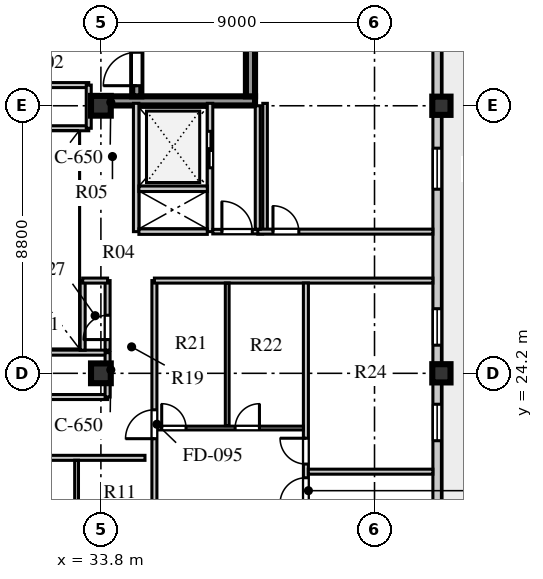
"""IFC4 building model, lengths in metres.
Left out: names, types, materials, properties, quantities, classifications, styles, units other than length and angle.
Written with IfcOpenShell. Run it as: python <this file> out.ifc"""

import sys

from ifc_helpers import new_model, si_unit, direction, frame, frame_2d, origin, origin_2d, place, context, subcontext, project, spatial, rectangle, extrude, element, fill, save


model = new_model("IFC4")
c1 = context("Model", 3, precision=1e-05, world=origin(), true_north=direction((0.0, 1.0)))
c2 = subcontext(c1, "Body", "Model", "MODEL_VIEW")
j1 = project(units=[si_unit("LENGTHUNIT", "METRE"), si_unit("PLANEANGLEUNIT", "RADIAN")], contexts=[c1])
p1 = place(None, origin())
s1 = spatial("IfcSite", under=j1, at=p1, CompositionType="ELEMENT")
p2 = place(p1, origin())
s2 = spatial("IfcBuilding", under=s1, at=p2, CompositionType="ELEMENT")
p3 = place(p2, frame((0.0, 0.0, 327.7)))
s3 = spatial("IfcBuildingStorey", under=s2, at=p3, CompositionType="ELEMENT", Elevation=327.7)
p4 = place(p3, frame((34.125, 33.16, 0.0), z_axis=(0.0, 0.0, 1.0), x_axis=(1.0, 0.0, 0.0)))
e1 = element("IfcWall", 1, at=p4, inside=s3, PredefinedType="SHEAR", context=c2, shape_type="SweptSolid", body=[
    extrude(rectangle(XDim=4.745, YDim=0.3, at=frame_2d((2.373, 0.0))), origin(), (0.0, 0.0, 1.0), 3.56),
])
p5 = place(p3, frame((34.98, 33.31, 0.0), z_axis=(0.0, 0.0, 1.0), x_axis=(0.0, 1.0, 0.0)))
e2 = element("IfcWall", 2, at=p5, inside=s3, PredefinedType="SHEAR", context=c2, shape_type="SweptSolid", body=[
    extrude(rectangle(XDim=8.03, YDim=0.3, at=frame_2d((4.015, 0.0))), origin(), (0.0, 0.0, 1.0), 3.56),
])
p6 = place(p5, frame((0.35, 0.0, 0.0)))
e3 = element("IfcOpeningElement", 3, at=p6, cuts=e2, PredefinedType="OPENING", context=c2, shape_type="SweptSolid", body=[
    extrude(rectangle(XDim=1.1, YDim=2.1, at=frame_2d((0.55, 1.05))), frame((0.0, 0.16, 0.0), z_axis=(0.0, -1.0, 0.0), x_axis=(1.0, 0.0, 0.0)), (0.0, 0.0, 1.0), 0.32),
])
p7 = place(p3, frame((38.72, 33.31, 0.0), z_axis=(0.0, 0.0, 1.0), x_axis=(0.0, 1.0, 0.0)))
e4 = element("IfcWall", 4, at=p7, inside=s3, PredefinedType="SHEAR", context=c2, shape_type="SweptSolid", body=[
    extrude(rectangle(XDim=8.03, YDim=0.3, at=frame_2d((4.015, 0.0))), origin(), (0.0, 0.0, 1.0), 3.56),
])
for number, where, z_axis, x_axis in (
    (5, (33.8, 24.2, 0.0), (0.0, 0.0, 1.0), (1.0, 0.0, 0.0)),
    (6, (33.8, 33.0, 0.0), (0.0, 0.0, 1.0), (1.0, 0.0, 0.0)),
):
    element("IfcColumn", number, at=place(p3, frame(where, z_axis=z_axis, x_axis=x_axis)), inside=s3, PredefinedType="COLUMN", context=c2, shape_type="SweptSolid", body=[
        extrude(rectangle(XDim=0.65, YDim=0.65, at=origin_2d()), origin(), (0.0, 0.0, 1.0), 3.56),
    ])
for number, where, z_axis, x_axis in (
    (7, (45.0, 24.2, 0.0), (0.0, 0.0, 1.0), (1.0, 0.0, 0.0)),
    (8, (45.0, 33.0, 0.0), (0.0, 0.0, 1.0), (1.0, 0.0, 0.0)),
):
    element("IfcColumn", number, at=place(p3, frame(where, z_axis=z_axis, x_axis=x_axis)), inside=s3, PredefinedType="COLUMN", context=c2, shape_type="SweptSolid", body=[
        extrude(rectangle(XDim=0.6, YDim=0.6, at=origin_2d()), origin(), (0.0, 0.0, 1.0), 3.56),
    ])
p8 = place(p3, frame((44.86, 14.68, 0.0), z_axis=(0.0, 0.0, 1.0), x_axis=(0.0, 1.0, 0.0)))
e9 = element("IfcWall", 9, at=p8, inside=s3, PredefinedType="STANDARD", context=c2, shape_type="SweptSolid", body=[
    extrude(rectangle(XDim=27.84, YDim=0.28, at=frame_2d((13.92, 0.0))), origin(), (0.0, 0.0, 1.0), 2.92),
])
p9 = place(p8, frame((1.3, 0.0, 0.0)))
e10 = element("IfcOpeningElement", 10, at=p9, cuts=e9, PredefinedType="OPENING", context=c2, shape_type="SweptSolid", body=[
    extrude(rectangle(XDim=1.2, YDim=2.05, at=frame_2d((0.6, 1.025))), frame((0.0, 0.15, 0.0), z_axis=(0.0, -1.0, 0.0), x_axis=(1.0, 0.0, 0.0)), (0.0, 0.0, 1.0), 0.3),
])
p10 = place(p8, frame((3.703, 0.0, 0.8)))
e11 = element("IfcOpeningElement", 11, at=p10, cuts=e9, PredefinedType="OPENING", context=c2, shape_type="SweptSolid", body=[
    extrude(rectangle(XDim=1.2, YDim=1.75, at=frame_2d((0.6, 0.875))), frame((0.0, 0.15, 0.0), z_axis=(0.0, -1.0, 0.0), x_axis=(1.0, 0.0, 0.0)), (0.0, 0.0, 1.0), 0.3),
])
p11 = place(p8, frame((7.303, 0.0, 0.8)))
e12 = element("IfcOpeningElement", 12, at=p11, cuts=e9, PredefinedType="OPENING", context=c2, shape_type="SweptSolid", body=[
    extrude(rectangle(XDim=1.2, YDim=1.75, at=frame_2d((0.6, 0.875))), frame((0.0, 0.15, 0.0), z_axis=(0.0, -1.0, 0.0), x_axis=(1.0, 0.0, 0.0)), (0.0, 0.0, 1.0), 0.3),
])
p12 = place(p8, frame((10.445, 0.0, 0.8)))
e13 = element("IfcOpeningElement", 13, at=p12, cuts=e9, PredefinedType="OPENING", context=c2, shape_type="SweptSolid", body=[
    extrude(rectangle(XDim=1.2, YDim=1.75, at=frame_2d((0.6, 0.875))), frame((0.0, 0.15, 0.0), z_axis=(0.0, -1.0, 0.0), x_axis=(1.0, 0.0, 0.0)), (0.0, 0.0, 1.0), 0.3),
])
p13 = place(p8, frame((15.575, 0.0, 0.8)))
e14 = element("IfcOpeningElement", 14, at=p13, cuts=e9, PredefinedType="OPENING", context=c2, shape_type="SweptSolid", body=[
    extrude(rectangle(XDim=1.35, YDim=1.9, at=frame_2d((0.675, 0.95))), frame((0.0, 0.15, 0.0), z_axis=(0.0, -1.0, 0.0), x_axis=(1.0, 0.0, 0.0)), (0.0, 0.0, 1.0), 0.3),
])
p14 = place(p8, frame((21.97, 0.0, 0.8)))
e15 = element("IfcOpeningElement", 15, at=p14, cuts=e9, PredefinedType="OPENING", context=c2, shape_type="SweptSolid", body=[
    extrude(rectangle(XDim=1.65, YDim=1.95, at=frame_2d((0.825, 0.975))), frame((0.0, 0.15, 0.0), z_axis=(0.0, -1.0, 0.0), x_axis=(1.0, 0.0, 0.0)), (0.0, 0.0, 1.0), 0.3),
])
p15 = place(p3, frame((34.96, 28.86, 0.0), z_axis=(0.0, 0.0, 1.0), x_axis=(0.0, 1.0, 0.0)))
e16 = element("IfcWall", 16, at=p15, inside=s3, PredefinedType="SOLIDWALL", context=c2, shape_type="SweptSolid", body=[
    extrude(rectangle(XDim=4.22, YDim=0.18, at=frame_2d((2.11, 0.0))), origin(), (0.0, 0.0, 1.0), 3.56),
])
p16 = place(p3, frame((37.39, 28.86, 0.0), z_axis=(0.0, 0.0, 1.0), x_axis=(0.0, 1.0, 0.0)))
e17 = element("IfcWall", 17, at=p16, inside=s3, PredefinedType="SOLIDWALL", context=c2, shape_type="SweptSolid", body=[
    extrude(rectangle(XDim=4.22, YDim=0.18, at=frame_2d((2.11, 0.0))), origin(), (0.0, 0.0, 1.0), 3.56),
])
p17 = place(p16, frame((2.1, 0.0, 0.0)))
e18 = element("IfcOpeningElement", 18, at=p17, cuts=e17, PredefinedType="OPENING", context=c2, shape_type="SweptSolid", body=[
    extrude(rectangle(XDim=1.2, YDim=2.12, at=frame_2d((0.6, 1.06))), frame((0.0, 0.1, 0.0), z_axis=(0.0, -1.0, 0.0), x_axis=(1.0, 0.0, 0.0)), (0.0, 0.0, 1.0), 0.2),
])
for number, where, z_axis, x_axis in (
    (19, (35.05, 28.86, 0.0), (0.0, 0.0, 1.0), (1.0, 0.0, 0.0)),
    (20, (35.05, 30.27, 0.0), (0.0, 0.0, 1.0), (1.0, 0.0, 0.0)),
):
    element("IfcWall", number, at=place(p3, frame(where, z_axis=z_axis, x_axis=x_axis)), inside=s3, PredefinedType="SOLIDWALL", context=c2, shape_type="SweptSolid", body=[
        extrude(rectangle(XDim=2.25, YDim=0.18, at=frame_2d((1.125, 0.0))), origin(), (0.0, 0.0, 1.0), 3.56),
    ])
p18 = place(p3, frame((39.2, 28.86, 0.0), z_axis=(0.0, 0.0, 1.0), x_axis=(0.0, 1.0, 0.0)))
e21 = element("IfcWall", 21, at=p18, inside=s3, PredefinedType="PARTITIONING", context=c2, shape_type="SweptSolid", body=[
    extrude(rectangle(XDim=4.22, YDim=0.15, at=frame_2d((2.11, 0.0))), origin(), (0.0, 0.0, 1.0), 3.56),
])
p19 = place(p3, frame((37.48, 28.86, 0.0), z_axis=(0.0, 0.0, 1.0), x_axis=(1.0, 0.0, 0.0)))
e22 = element("IfcWall", 22, at=p19, inside=s3, PredefinedType="PARTITIONING", context=c2, shape_type="SweptSolid", body=[
    extrude(rectangle(XDim=1.64, YDim=0.15, at=frame_2d((0.82, 0.0))), origin(), (0.0, 0.0, 1.0), 3.56),
])
p20 = place(p19, frame((0.3, 0.0, 0.0)))
e23 = element("IfcOpeningElement", 23, at=p20, cuts=e22, PredefinedType="OPENING", context=c2, shape_type="SweptSolid", body=[
    extrude(rectangle(XDim=1.0, YDim=2.1, at=frame_2d((0.5, 1.05))), frame((0.0, 0.085, 0.0), z_axis=(0.0, -1.0, 0.0), x_axis=(1.0, 0.0, 0.0)), (0.0, 0.0, 1.0), 0.17),
])
p21 = place(p3, frame((27.08, 21.42, 0.0), z_axis=(0.0, 0.0, 1.0), x_axis=(1.0, 0.0, 0.0)))
e24 = element("IfcWall", 24, at=p21, inside=s3, PredefinedType="PARTITIONING", context=c2, shape_type="SweptSolid", body=[
    extrude(rectangle(XDim=8.17, YDim=0.165, at=frame_2d((4.085, 0.0))), origin(), (0.0, 0.0, 1.0), 3.26),
])
p22 = place(p21, frame((0.63, 0.0, 0.0)))
e25 = element("IfcOpeningElement", 25, at=p22, cuts=e24, PredefinedType="OPENING", context=c2, shape_type="SweptSolid", body=[
    extrude(rectangle(XDim=0.95, YDim=2.1, at=frame_2d((0.475, 1.05))), frame((0.0, 0.093, 0.0), z_axis=(0.0, -1.0, 0.0), x_axis=(1.0, 0.0, 0.0)), (0.0, 0.0, 1.0), 0.185),
])
p23 = place(p3, frame((33.0, 16.189, 0.0), z_axis=(0.0, 0.0, 1.0), x_axis=(0.0, 1.0, 0.0)))
e26 = element("IfcWall", 26, at=p23, inside=s3, PredefinedType="PLUMBINGWALL", context=c2, shape_type="SweptSolid", body=[
    extrude(rectangle(XDim=5.151, YDim=0.125, at=frame_2d((2.576, 0.0))), origin(), (0.0, 0.0, 1.0), 3.56),
])
p24 = place(p23, frame((0.16, 0.0, 0.0)))
e27 = element("IfcOpeningElement", 27, at=p24, cuts=e26, PredefinedType="OPENING", context=c2, shape_type="SweptSolid", body=[
    extrude(rectangle(XDim=0.8, YDim=2.05, at=frame_2d((0.4, 1.025))), frame((0.0, 0.073, 0.0), z_axis=(0.0, -1.0, 0.0), x_axis=(1.0, 0.0, 0.0)), (0.0, 0.0, 1.0), 0.145),
])
p25 = place(p23, frame((2.752, 0.0, 0.0)))
e28 = element("IfcOpeningElement", 28, at=p25, cuts=e26, PredefinedType="OPENING", context=c2, shape_type="SweptSolid", body=[
    extrude(rectangle(XDim=0.85, YDim=2.08, at=frame_2d((0.425, 1.04))), frame((0.0, 0.073, 0.0), z_axis=(0.0, -1.0, 0.0), x_axis=(1.0, 0.0, 0.0)), (0.0, 0.0, 1.0), 0.145),
])
p26 = place(p3, frame((35.56, 14.68, 0.0), z_axis=(0.0, 0.0, 1.0), x_axis=(0.0, 1.0, 0.0)))
e29 = element("IfcWall", 29, at=p26, inside=s3, PredefinedType="PARTITIONING", context=c2, shape_type="SweptSolid", body=[
    extrude(rectangle(XDim=12.57, YDim=0.165, at=frame_2d((6.285, 0.0))), origin(), (0.0, 0.0, 1.0), 3.56),
])
p27 = place(p26, frame((7.37, 0.0, 0.0)))
e30 = element("IfcOpeningElement", 30, at=p27, cuts=e29, PredefinedType="OPENING", context=c2, shape_type="SweptSolid", body=[
    extrude(rectangle(XDim=0.95, YDim=2.1, at=frame_2d((0.475, 1.05))), frame((0.0, 0.093, 0.0), z_axis=(0.0, -1.0, 0.0), x_axis=(1.0, 0.0, 0.0)), (0.0, 0.0, 1.0), 0.185),
])
p28 = place(p3, frame((35.56, 27.25, 0.0), z_axis=(0.0, 0.0, 1.0), x_axis=(1.0, 0.0, 0.0)))
e31 = element("IfcWall", 31, at=p28, inside=s3, PredefinedType="PARTITIONING", context=c2, shape_type="SweptSolid", body=[
    extrude(rectangle(XDim=9.16, YDim=0.165, at=frame_2d((4.58, 0.0))), origin(), (0.0, 0.0, 1.0), 3.56),
])
p29 = place(p3, frame((40.543, 14.76, 0.0), z_axis=(0.0, 0.0, 1.0), x_axis=(0.0, 1.0, 0.0)))
e32 = element("IfcWall", 32, at=p29, inside=s3, PredefinedType="PARTITIONING", context=c2, shape_type="SweptSolid", body=[
    extrude(rectangle(XDim=12.41, YDim=0.165, at=frame_2d((6.205, 0.0))), origin(), (0.0, 0.0, 1.0), 3.56),
])
p30 = place(p29, frame((5.155, 0.0, 0.0)))
e33 = element("IfcOpeningElement", 33, at=p30, cuts=e32, PredefinedType="OPENING", context=c2, shape_type="SweptSolid", body=[
    extrude(rectangle(XDim=0.85, YDim=2.08, at=frame_2d((0.425, 1.04))), frame((0.0, 0.093, 0.0), z_axis=(0.0, -1.0, 0.0), x_axis=(1.0, 0.0, 0.0)), (0.0, 0.0, 1.0), 0.185),
])
p31 = place(p29, frame((6.455, 0.0, 0.0)))
e34 = element("IfcOpeningElement", 34, at=p31, cuts=e32, PredefinedType="OPENING", context=c2, shape_type="SweptSolid", body=[
    extrude(rectangle(XDim=0.85, YDim=2.08, at=frame_2d((0.425, 1.04))), frame((0.0, 0.093, 0.0), z_axis=(0.0, -1.0, 0.0), x_axis=(1.0, 0.0, 0.0)), (0.0, 0.0, 1.0), 0.185),
])
p32 = place(p3, frame((35.64, 22.4, 0.0), z_axis=(0.0, 0.0, 1.0), x_axis=(1.0, 0.0, 0.0)))
e35 = element("IfcWall", 35, at=p32, inside=s3, PredefinedType="PLUMBINGWALL", context=c2, shape_type="SweptSolid", body=[
    extrude(rectangle(XDim=4.823, YDim=0.125, at=frame_2d((2.412, 0.0))), origin(), (0.0, 0.0, 1.0), 3.56),
])
p33 = place(p32, frame((0.16, 0.0, 0.0)))
e36 = element("IfcOpeningElement", 36, at=p33, cuts=e35, PredefinedType="OPENING", context=c2, shape_type="SweptSolid", body=[
    extrude(rectangle(XDim=0.8, YDim=2.05, at=frame_2d((0.4, 1.025))), frame((0.0, 0.073, 0.0), z_axis=(0.0, -1.0, 0.0), x_axis=(1.0, 0.0, 0.0)), (0.0, 0.0, 1.0), 0.145),
])
p34 = place(p32, frame((2.575, 0.0, 0.0)))
e37 = element("IfcOpeningElement", 37, at=p34, cuts=e35, PredefinedType="OPENING", context=c2, shape_type="SweptSolid", body=[
    extrude(rectangle(XDim=0.8, YDim=2.05, at=frame_2d((0.4, 1.025))), frame((0.0, 0.073, 0.0), z_axis=(0.0, -1.0, 0.0), x_axis=(1.0, 0.0, 0.0)), (0.0, 0.0, 1.0), 0.145),
])
p35 = place(p3, frame((37.955, 22.48, 0.0), z_axis=(0.0, 0.0, 1.0), x_axis=(0.0, 1.0, 0.0)))
e38 = element("IfcWall", 38, at=p35, inside=s3, PredefinedType="PLUMBINGWALL", context=c2, shape_type="SweptSolid", body=[
    extrude(rectangle(XDim=4.69, YDim=0.125, at=frame_2d((2.345, 0.0))), origin(), (0.0, 0.0, 1.0), 3.56),
])
p36 = place(p3, frame((40.623, 20.965, 0.0), z_axis=(0.0, 0.0, 1.0), x_axis=(1.0, 0.0, 0.0)))
e39 = element("IfcWall", 39, at=p36, inside=s3, PredefinedType="PARTITIONING", context=c2, shape_type="SweptSolid", body=[
    extrude(rectangle(XDim=4.097, YDim=0.165, at=frame_2d((2.048, 0.0))), origin(), (0.0, 0.0, 1.0), 3.56),
])
p37 = place(p3, frame((38.96, 28.86, 0.0), z_axis=(0.0, 0.0, 1.0), x_axis=(1.0, 0.0, 0.0)))
e40 = element("IfcWall", 40, at=p37, inside=s3, PredefinedType="PARTITIONING", context=c2, shape_type="SweptSolid", body=[
    extrude(rectangle(XDim=5.76, YDim=0.165, at=frame_2d((2.88, 0.0))), origin(), (0.0, 0.0, 1.0), 3.56),
])
p38 = place(p37, frame((0.5, 0.0, 0.0)))
e41 = element("IfcOpeningElement", 41, at=p38, cuts=e40, PredefinedType="OPENING", context=c2, shape_type="SweptSolid", body=[
    extrude(rectangle(XDim=0.85, YDim=2.05, at=frame_2d((0.425, 1.025))), frame((0.0, 0.093, 0.0), z_axis=(0.0, -1.0, 0.0), x_axis=(1.0, 0.0, 0.0)), (0.0, 0.0, 1.0), 0.185),
])
p39 = place(p3, frame((38.96, 28.94, 0.0), z_axis=(0.0, 0.0, 1.0), x_axis=(0.0, 1.0, 0.0)))
e42 = element("IfcWall", 42, at=p39, inside=s3, PredefinedType="PARTITIONING", context=c2, shape_type="SweptSolid", body=[
    extrude(rectangle(XDim=4.06, YDim=0.165, at=frame_2d((2.03, 0.0))), origin(), (0.0, 0.0, 1.0), 3.56),
])
p40 = place(p3, frame((27.2, 23.42, 0.0), z_axis=(0.0, 0.0, 1.0), x_axis=(1.0, 0.0, 0.0)))
e43 = element("IfcWall", 43, at=p40, inside=s3, PredefinedType="PARTITIONING", context=c2, shape_type="SweptSolid", body=[
    extrude(rectangle(XDim=6.82, YDim=0.165, at=frame_2d((3.41, 0.0))), origin(), (0.0, 0.0, 1.0), 3.56),
])
p41 = place(p40, frame((0.43, 0.0, 0.0)))
e44 = element("IfcOpeningElement", 44, at=p41, cuts=e43, PredefinedType="OPENING", context=c2, shape_type="SweptSolid", body=[
    extrude(rectangle(XDim=0.8, YDim=2.05, at=frame_2d((0.4, 1.025))), frame((0.0, 0.093, 0.0), z_axis=(0.0, -1.0, 0.0), x_axis=(1.0, 0.0, 0.0)), (0.0, 0.0, 1.0), 0.185),
])
p42 = place(p3, frame((27.2, 24.88, 0.0), z_axis=(0.0, 0.0, 1.0), x_axis=(1.0, 0.0, 0.0)))
e45 = element("IfcWall", 45, at=p42, inside=s3, PredefinedType="PARTITIONING", context=c2, shape_type="SweptSolid", body=[
    extrude(rectangle(XDim=6.82, YDim=0.165, at=frame_2d((3.41, 0.0))), origin(), (0.0, 0.0, 1.0), 3.01),
])
p43 = place(p3, frame((34.02, 23.42, 0.0), z_axis=(0.0, 0.0, 1.0), x_axis=(0.0, 1.0, 0.0)))
e46 = element("IfcWall", 46, at=p43, inside=s3, PredefinedType="PARTITIONING", context=c2, shape_type="SweptSolid", body=[
    extrude(rectangle(XDim=1.46, YDim=0.165, at=frame_2d((0.73, 0.0))), origin(), (0.0, 0.0, 1.0), 2.96),
])
p44 = place(p3, frame((33.2, 24.96, 0.0), z_axis=(0.0, 0.0, 1.0), x_axis=(0.0, 1.0, 0.0)))
e47 = element("IfcWall", 47, at=p44, inside=s3, PredefinedType="PARTITIONING", context=c2, shape_type="SweptSolid", body=[
    extrude(rectangle(XDim=2.29, YDim=0.165, at=frame_2d((1.145, 0.0))), origin(), (0.0, 0.0, 1.0), 3.01),
])
p45 = place(p3, frame((34.02, 24.96, 0.0), z_axis=(0.0, 0.0, 1.0), x_axis=(0.0, 1.0, 0.0)))
e48 = element("IfcWall", 48, at=p45, inside=s3, PredefinedType="PARTITIONING", context=c2, shape_type="SweptSolid", body=[
    extrude(rectangle(XDim=2.29, YDim=0.165, at=frame_2d((1.145, 0.0))), origin(), (0.0, 0.0, 1.0), 2.96),
])
p46 = place(p45, frame((0.35, 0.0, 0.0)))
e49 = element("IfcOpeningElement", 49, at=p46, cuts=e48, PredefinedType="OPENING", context=c2, shape_type="SweptSolid", body=[
    extrude(rectangle(XDim=0.8, YDim=2.05, at=frame_2d((0.4, 1.025))), frame((0.0, 0.093, 0.0), z_axis=(0.0, -1.0, 0.0), x_axis=(1.0, 0.0, 0.0)), (0.0, 0.0, 1.0), 0.185),
])
p47 = place(p3, frame((33.2, 27.25, 0.0), z_axis=(0.0, 0.0, 1.0), x_axis=(1.0, 0.0, 0.0)))
e50 = element("IfcWall", 50, at=p47, inside=s3, PredefinedType="PARTITIONING", context=c2, shape_type="SweptSolid", body=[
    extrude(rectangle(XDim=0.82, YDim=0.165, at=frame_2d((0.41, 0.0))), origin(), (0.0, 0.0, 1.0), 3.56),
])
p48 = place(p3, frame((27.2, 33.68, 0.0), z_axis=(0.0, 0.0, 1.0), x_axis=(1.0, 0.0, 0.0)))
e51 = element("IfcWall", 51, at=p48, inside=s3, PredefinedType="PARTITIONING", context=c2, shape_type="SweptSolid", body=[
    extrude(rectangle(XDim=6.2, YDim=0.165, at=frame_2d((3.1, 0.0))), origin(), (0.0, 0.0, 1.0), 3.56),
])
p49 = place(p48, frame((1.2, 0.0, 0.0)))
e52 = element("IfcOpeningElement", 52, at=p49, cuts=e51, PredefinedType="OPENING", context=c2, shape_type="SweptSolid", body=[
    extrude(rectangle(XDim=0.8, YDim=2.05, at=frame_2d((0.4, 1.025))), frame((0.0, 0.093, 0.0), z_axis=(0.0, -1.0, 0.0), x_axis=(1.0, 0.0, 0.0)), (0.0, 0.0, 1.0), 0.185),
])
p50 = place(p3, frame((27.2, 32.26, 0.0), z_axis=(0.0, 0.0, 1.0), x_axis=(1.0, 0.0, 0.0)))
e53 = element("IfcWall", 53, at=p50, inside=s3, PredefinedType="PARTITIONING", context=c2, shape_type="SweptSolid", body=[
    extrude(rectangle(XDim=6.2, YDim=0.165, at=frame_2d((3.1, 0.0))), origin(), (0.0, 0.0, 1.0), 3.01),
])
p51 = place(p3, frame((33.4, 32.26, 0.0), z_axis=(0.0, 0.0, 1.0), x_axis=(0.0, 1.0, 0.0)))
e54 = element("IfcWall", 54, at=p51, inside=s3, PredefinedType="PARTITIONING", context=c2, shape_type="SweptSolid", body=[
    extrude(rectangle(XDim=1.42, YDim=0.165, at=frame_2d((0.71, 0.0))), origin(), (0.0, 0.0, 1.0), 3.01),
])
p52 = place(p11, origin())
e55 = element("IfcWindow", 55, at=p52, inside=s3, PartitioningType="SINGLE_PANEL", PredefinedType="WINDOW", context=c2, shape_type="SweptSolid", body=[
    extrude(rectangle(XDim=1.2, YDim=1.75, at=frame_2d((0.6, 0.875))), frame((0.0, 0.03, 0.0), z_axis=(0.0, -1.0, 0.0), x_axis=(1.0, 0.0, 0.0)), (0.0, 0.0, 1.0), 0.06),
])
fill(e12, e55)
p53 = place(p12, origin())
e56 = element("IfcWindow", 56, at=p53, inside=s3, PartitioningType="SINGLE_PANEL", PredefinedType="WINDOW", context=c2, shape_type="SweptSolid", body=[
    extrude(rectangle(XDim=1.2, YDim=1.75, at=frame_2d((0.6, 0.875))), frame((0.0, 0.03, 0.0), z_axis=(0.0, -1.0, 0.0), x_axis=(1.0, 0.0, 0.0)), (0.0, 0.0, 1.0), 0.06),
])
fill(e13, e56)
p54 = place(p13, origin())
e57 = element("IfcWindow", 57, at=p54, inside=s3, PartitioningType="SINGLE_PANEL", PredefinedType="WINDOW", context=c2, shape_type="SweptSolid", body=[
    extrude(rectangle(XDim=1.35, YDim=1.9, at=frame_2d((0.675, 0.95))), frame((0.0, 0.03, 0.0), z_axis=(0.0, -1.0, 0.0), x_axis=(1.0, 0.0, 0.0)), (0.0, 0.0, 1.0), 0.06),
])
fill(e14, e57)
p55 = place(p6, origin())
e58 = element("IfcDoor", 58, at=p55, inside=s3, OperationType="SINGLE_SWING_LEFT", PredefinedType="DOOR", context=c2, shape_type="SweptSolid", body=[
    extrude(rectangle(XDim=1.1, YDim=2.1, at=frame_2d((0.55, 1.05))), frame((0.0, 0.025, 0.0), z_axis=(0.0, -1.0, 0.0), x_axis=(1.0, 0.0, 0.0)), (0.0, 0.0, 1.0), 0.05),
])
fill(e3, e58)
p56 = place(p17, frame((1.2, 0.0, 0.0), z_axis=(0.0, 0.0, 1.0), x_axis=(-1.0, 0.0, 0.0)))
e59 = element("IfcDoor", 59, at=p56, inside=s3, OperationType="DOUBLE_DOOR_SLIDING", PredefinedType="DOOR", context=c2, shape_type="SweptSolid", body=[
    extrude(rectangle(XDim=1.2, YDim=2.12, at=frame_2d((0.6, 1.06))), frame((0.0, 0.025, 0.0), z_axis=(0.0, -1.0, 0.0), x_axis=(1.0, 0.0, 0.0)), (0.0, 0.0, 1.0), 0.05),
])
fill(e18, e59)
p57 = place(p20, origin())
e60 = element("IfcDoor", 60, at=p57, inside=s3, OperationType="SINGLE_SWING_LEFT", PredefinedType="DOOR", context=c2, shape_type="SweptSolid", body=[
    extrude(rectangle(XDim=1.0, YDim=2.1, at=frame_2d((0.5, 1.05))), frame((0.0, 0.025, 0.0), z_axis=(0.0, -1.0, 0.0), x_axis=(1.0, 0.0, 0.0)), (0.0, 0.0, 1.0), 0.05),
])
fill(e23, e60)
p58 = place(p33, origin())
e61 = element("IfcDoor", 61, at=p58, inside=s3, OperationType="SINGLE_SWING_LEFT", PredefinedType="DOOR", context=c2, shape_type="SweptSolid", body=[
    extrude(rectangle(XDim=0.8, YDim=2.05, at=frame_2d((0.4, 1.025))), frame((0.0, 0.025, 0.0), z_axis=(0.0, -1.0, 0.0), x_axis=(1.0, 0.0, 0.0)), (0.0, 0.0, 1.0), 0.05),
])
fill(e36, e61)
p59 = place(p34, origin())
e62 = element("IfcDoor", 62, at=p59, inside=s3, OperationType="SINGLE_SWING_RIGHT", PredefinedType="DOOR", context=c2, shape_type="SweptSolid", body=[
    extrude(rectangle(XDim=0.8, YDim=2.05, at=frame_2d((0.4, 1.025))), frame((0.0, 0.025, 0.0), z_axis=(0.0, -1.0, 0.0), x_axis=(1.0, 0.0, 0.0)), (0.0, 0.0, 1.0), 0.05),
])
fill(e37, e62)
p60 = place(p30, origin())
e63 = element("IfcDoor", 63, at=p60, inside=s3, OperationType="SINGLE_SWING_LEFT", PredefinedType="DOOR", context=c2, shape_type="SweptSolid", body=[
    extrude(rectangle(XDim=0.85, YDim=2.08, at=frame_2d((0.425, 1.04))), frame((0.0, 0.025, 0.0), z_axis=(0.0, -1.0, 0.0), x_axis=(1.0, 0.0, 0.0)), (0.0, 0.0, 1.0), 0.05),
])
fill(e33, e63)
p61 = place(p31, origin())
e64 = element("IfcDoor", 64, at=p61, inside=s3, OperationType="SINGLE_SWING_RIGHT", PredefinedType="DOOR", context=c2, shape_type="SweptSolid", body=[
    extrude(rectangle(XDim=0.85, YDim=2.08, at=frame_2d((0.425, 1.04))), frame((0.0, 0.025, 0.0), z_axis=(0.0, -1.0, 0.0), x_axis=(1.0, 0.0, 0.0)), (0.0, 0.0, 1.0), 0.05),
])
fill(e34, e64)
p62 = place(p27, origin())
e65 = element("IfcDoor", 65, at=p62, inside=s3, OperationType="SINGLE_SWING_LEFT", PredefinedType="DOOR", context=c2, shape_type="SweptSolid", body=[
    extrude(rectangle(XDim=0.95, YDim=2.1, at=frame_2d((0.475, 1.05))), frame((0.0, 0.025, 0.0), z_axis=(0.0, -1.0, 0.0), x_axis=(1.0, 0.0, 0.0)), (0.0, 0.0, 1.0), 0.05),
])
fill(e30, e65)
p63 = place(p38, origin())
e66 = element("IfcDoor", 66, at=p63, inside=s3, OperationType="SINGLE_SWING_LEFT", PredefinedType="DOOR", context=c2, shape_type="SweptSolid", body=[
    extrude(rectangle(XDim=0.85, YDim=2.05, at=frame_2d((0.425, 1.025))), frame((0.0, 0.025, 0.0), z_axis=(0.0, -1.0, 0.0), x_axis=(1.0, 0.0, 0.0)), (0.0, 0.0, 1.0), 0.05),
])
fill(e41, e66)
p64 = place(p46, origin())
e67 = element("IfcDoor", 67, at=p64, inside=s3, OperationType="SINGLE_SWING_LEFT", PredefinedType="DOOR", context=c2, shape_type="SweptSolid", body=[
    extrude(rectangle(XDim=0.8, YDim=2.05, at=frame_2d((0.4, 1.025))), frame((0.0, 0.025, 0.0), z_axis=(0.0, -1.0, 0.0), x_axis=(1.0, 0.0, 0.0)), (0.0, 0.0, 1.0), 0.05),
])
fill(e49, e67)
save(model, sys.argv[1])
